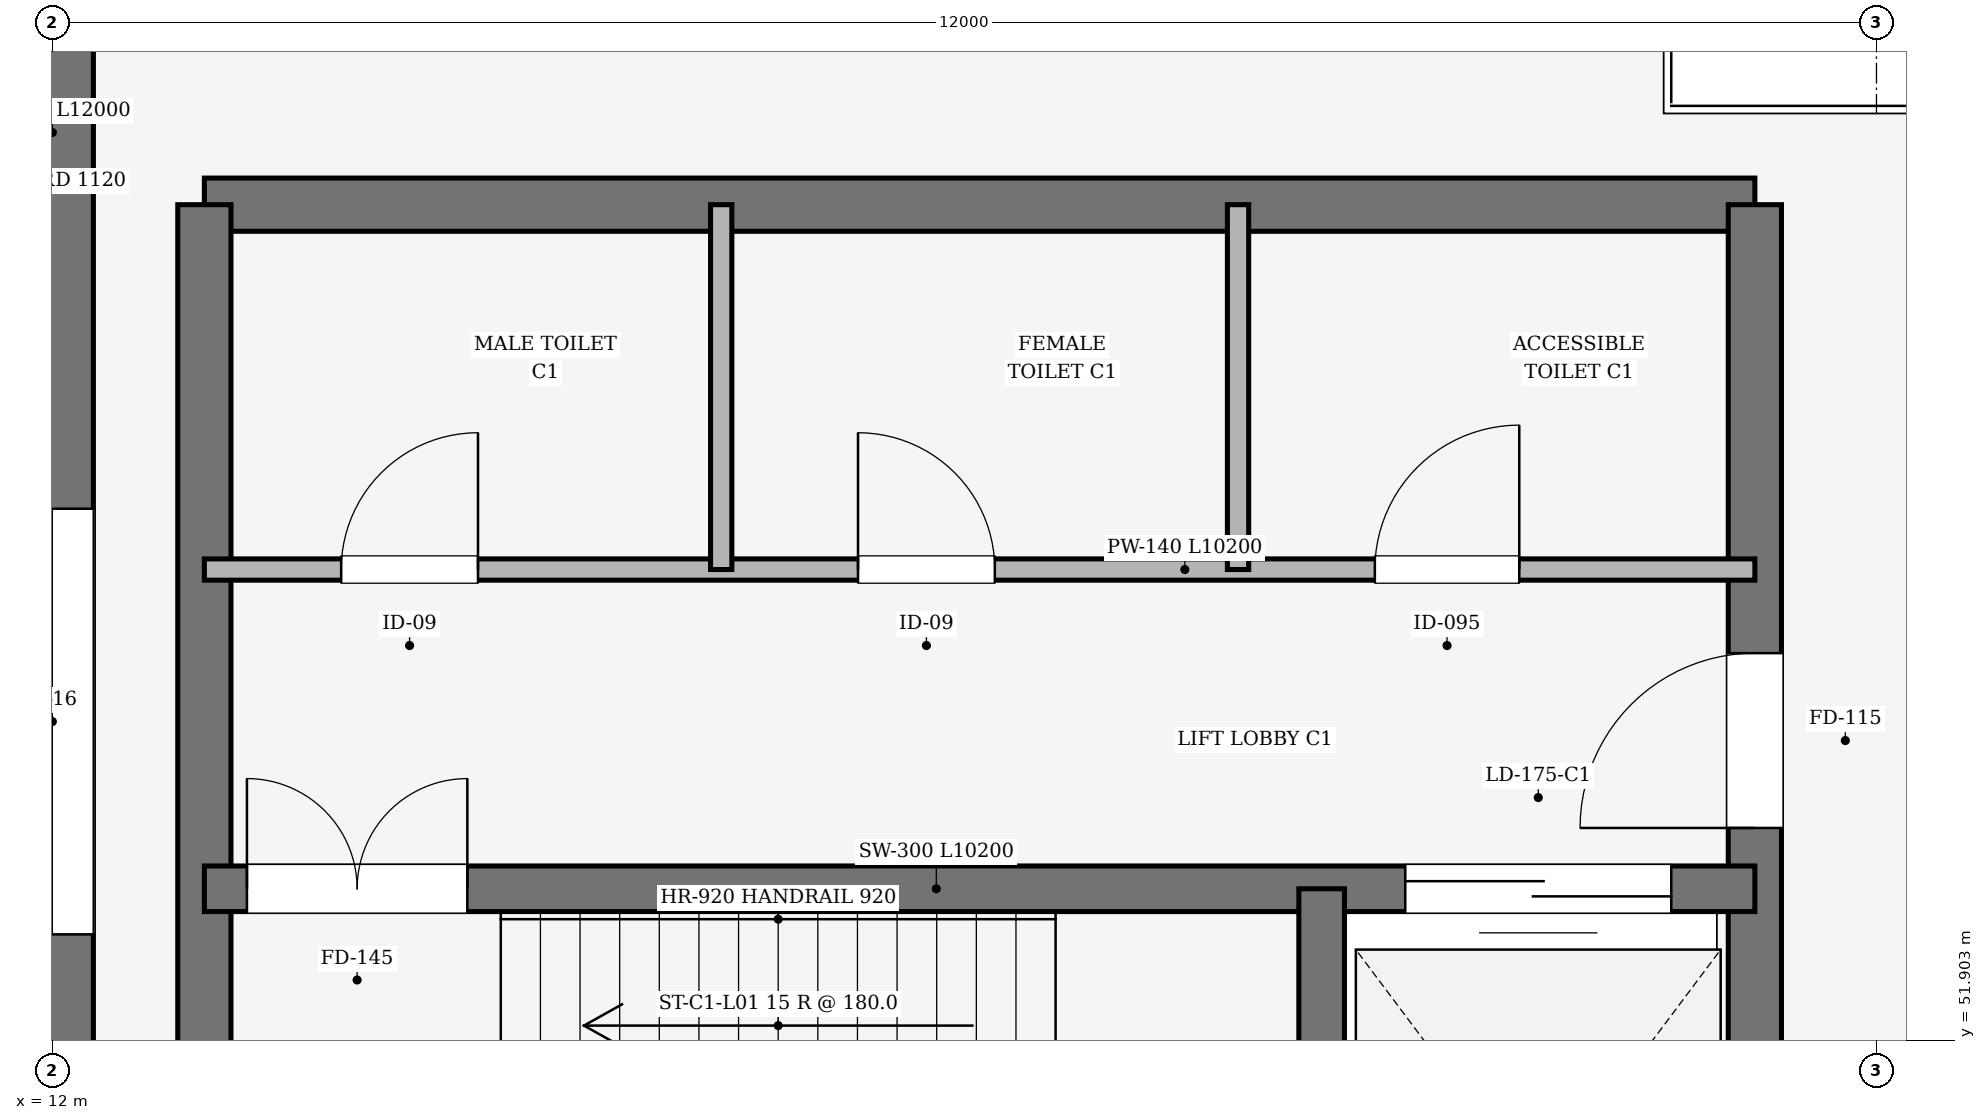
"""IFC4 building model, lengths in metres.
Left out: names, types, materials, properties, quantities, classifications, styles, units other than length and angle.
Written with IfcOpenShell. Run it as: python <this file> out.ifc"""

import sys

from ifc_helpers import new_model, si_unit, direction, frame, frame_2d, origin, place, context, subcontext, project, spatial, rectangle, extrude, element, fill, save


model = new_model("IFC4")
c1 = context("Model", 3, precision=1e-05, world=origin(), true_north=direction((0.0, 1.0)))
c2 = subcontext(c1, "Body", "Model", "MODEL_VIEW")
j1 = project(units=[si_unit("LENGTHUNIT", "METRE"), si_unit("PLANEANGLEUNIT", "RADIAN")], contexts=[c1])
p1 = place(None, origin())
s1 = spatial("IfcSite", under=j1, at=p1, CompositionType="ELEMENT")
p2 = place(p1, origin())
s2 = spatial("IfcBuilding", under=s1, at=p2, CompositionType="ELEMENT")
p3 = place(p2, frame((0.0, 0.0, 5.4)))
s3 = spatial("IfcBuildingStorey", under=s2, at=p3, CompositionType="ELEMENT", Elevation=5.4)
p4 = place(p3, frame((12.0, 60.0, 0.0), z_axis=(0.0, 0.0, 1.0), x_axis=(0.0, -1.0, 0.0)))
e1 = element("IfcWall", 1, at=p4, inside=s3, PredefinedType="SOLIDWALL", context=c2, shape_type="SweptSolid", body=[
    extrude(rectangle(XDim=12.0, YDim=0.54, at=frame_2d((6.0, 0.0))), origin(), (0.0, 0.0, 1.0), 4.0),
])
p5 = place(p4, frame((4.6, 0.0, 1.3)))
e2 = element("IfcOpeningElement", 2, at=p5, cuts=e1, PredefinedType="OPENING", context=c2, shape_type="SweptSolid", body=[
    extrude(rectangle(XDim=2.8, YDim=1.35, at=frame_2d((1.4, 0.675))), frame((0.0, 0.28, 0.0), z_axis=(0.0, -1.0, 0.0), x_axis=(1.0, 0.0, 0.0)), (0.0, 0.0, 1.0), 0.56),
])
p6 = place(p3, frame((23.2, 57.4, 0.0), z_axis=(0.0, 0.0, 1.0), x_axis=(-1.0, 0.0, 0.0)))
e3 = element("IfcWall", 3, at=p6, inside=s3, PredefinedType="SHEAR", context=c2, shape_type="SweptSolid", body=[
    extrude(rectangle(XDim=10.2, YDim=0.35, at=frame_2d((5.1, 0.0))), origin(), (0.0, 0.0, 1.0), 5.4),
])
p7 = place(p3, frame((13.0, 57.4, 0.0), z_axis=(0.0, 0.0, 1.0), x_axis=(0.0, -1.0, 0.0)))
e4 = element("IfcWall", 4, at=p7, inside=s3, PredefinedType="SHEAR", context=c2, shape_type="SweptSolid", body=[
    extrude(rectangle(XDim=8.4, YDim=0.35, at=frame_2d((4.2, 0.0))), origin(), (0.0, 0.0, 1.0), 5.4),
])
p8 = place(p3, frame((23.2, 49.0, 0.0), z_axis=(0.0, 0.0, 1.0), x_axis=(0.0, 1.0, 0.0)))
e5 = element("IfcWall", 5, at=p8, inside=s3, PredefinedType="SHEAR", context=c2, shape_type="SweptSolid", body=[
    extrude(rectangle(XDim=8.4, YDim=0.35, at=frame_2d((4.2, 0.0))), origin(), (0.0, 0.0, 1.0), 5.4),
])
p9 = place(p8, frame((4.3, 0.0, 0.0)))
e6 = element("IfcOpeningElement", 6, at=p9, cuts=e5, PredefinedType="OPENING", context=c2, shape_type="SweptSolid", body=[
    extrude(rectangle(XDim=1.15, YDim=2.15, at=frame_2d((0.575, 1.075))), frame((0.0, 0.185, 0.0), z_axis=(0.0, -1.0, 0.0), x_axis=(1.0, 0.0, 0.0)), (0.0, 0.0, 1.0), 0.37),
])
p10 = place(p3, frame((13.0, 52.9, 0.0), z_axis=(0.0, 0.0, 1.0), x_axis=(1.0, 0.0, 0.0)))
e7 = element("IfcWall", 7, at=p10, inside=s3, PredefinedType="SHEAR", context=c2, shape_type="SweptSolid", body=[
    extrude(rectangle(XDim=10.2, YDim=0.3, at=frame_2d((5.1, 0.0))), origin(), (0.0, 0.0, 1.0), 5.4),
])
p11 = place(p10, frame((0.28, 0.0, 0.0)))
e8 = element("IfcOpeningElement", 8, at=p11, cuts=e7, PredefinedType="OPENING", context=c2, shape_type="SweptSolid", body=[
    extrude(rectangle(XDim=1.45, YDim=2.15, at=frame_2d((0.725, 1.075))), frame((0.0, 0.16, 0.0), z_axis=(0.0, -1.0, 0.0), x_axis=(1.0, 0.0, 0.0)), (0.0, 0.0, 1.0), 0.32),
])
p12 = place(p10, frame((7.9, 0.0, 0.0)))
e9 = element("IfcOpeningElement", 9, at=p12, cuts=e7, PredefinedType="OPENING", context=c2, shape_type="SweptSolid", body=[
    extrude(rectangle(XDim=1.75, YDim=2.3, at=frame_2d((0.875, 1.15))), frame((0.0, 0.16, 0.0), z_axis=(0.0, -1.0, 0.0), x_axis=(1.0, 0.0, 0.0)), (0.0, 0.0, 1.0), 0.32),
])
p13 = place(p3, frame((20.35, 49.0, 0.0), z_axis=(0.0, 0.0, 1.0), x_axis=(0.0, 1.0, 0.0)))
e10 = element("IfcWall", 10, at=p13, inside=s3, PredefinedType="SHEAR", context=c2, shape_type="SweptSolid", body=[
    extrude(rectangle(XDim=3.9, YDim=0.3, at=frame_2d((1.95, 0.0))), origin(), (0.0, 0.0, 1.0), 5.4),
])
p14 = place(p3, frame((13.0, 55.0, 0.0), z_axis=(0.0, 0.0, 1.0), x_axis=(1.0, 0.0, 0.0)))
e11 = element("IfcWall", 11, at=p14, inside=s3, PredefinedType="PARTITIONING", context=c2, shape_type="SweptSolid", body=[
    extrude(rectangle(XDim=10.2, YDim=0.14, at=frame_2d((5.1, 0.0))), origin(), (0.0, 0.0, 1.0), 4.035),
])
p15 = place(p14, frame((0.9, 0.0, 0.0)))
e12 = element("IfcOpeningElement", 12, at=p15, cuts=e11, PredefinedType="OPENING", context=c2, shape_type="SweptSolid", body=[
    extrude(rectangle(XDim=0.9, YDim=2.1, at=frame_2d((0.45, 1.05))), frame((0.0, 0.08, 0.0), z_axis=(0.0, -1.0, 0.0), x_axis=(1.0, 0.0, 0.0)), (0.0, 0.0, 1.0), 0.16),
])
p16 = place(p14, frame((4.3, 0.0, 0.0)))
e13 = element("IfcOpeningElement", 13, at=p16, cuts=e11, PredefinedType="OPENING", context=c2, shape_type="SweptSolid", body=[
    extrude(rectangle(XDim=0.9, YDim=2.1, at=frame_2d((0.45, 1.05))), frame((0.0, 0.08, 0.0), z_axis=(0.0, -1.0, 0.0), x_axis=(1.0, 0.0, 0.0)), (0.0, 0.0, 1.0), 0.16),
])
p17 = place(p14, frame((7.7, 0.0, 0.0)))
e14 = element("IfcOpeningElement", 14, at=p17, cuts=e11, PredefinedType="OPENING", context=c2, shape_type="SweptSolid", body=[
    extrude(rectangle(XDim=0.95, YDim=2.1, at=frame_2d((0.475, 1.05))), frame((0.0, 0.08, 0.0), z_axis=(0.0, -1.0, 0.0), x_axis=(1.0, 0.0, 0.0)), (0.0, 0.0, 1.0), 0.16),
])
for number, where, z_axis, x_axis in (
    (15, (16.4, 55.0, 0.0), (0.0, 0.0, 1.0), (0.0, 1.0, 0.0)),
    (16, (19.8, 55.0, 0.0), (0.0, 0.0, 1.0), (0.0, 1.0, 0.0)),
):
    element("IfcWall", number, at=place(p3, frame(where, z_axis=z_axis, x_axis=x_axis)), inside=s3, PredefinedType="PARTITIONING", context=c2, shape_type="SweptSolid", body=[
        extrude(rectangle(XDim=2.4, YDim=0.14, at=frame_2d((1.2, 0.0))), origin(), (0.0, 0.0, 1.0), 4.5),
    ])
p18 = place(p5, origin())
e17 = element("IfcWindow", 17, at=p18, inside=s3, PartitioningType="TRIPLE_PANEL_HORIZONTAL", PredefinedType="WINDOW", context=c2, shape_type="SweptSolid", body=[
    extrude(rectangle(XDim=2.8, YDim=1.35, at=frame_2d((1.4, 0.675))), frame((0.0, 0.03, 0.0), z_axis=(0.0, -1.0, 0.0), x_axis=(1.0, 0.0, 0.0)), (0.0, 0.0, 1.0), 0.06),
])
fill(e2, e17)
p19 = place(p9, origin())
e18 = element("IfcDoor", 18, at=p19, inside=s3, OperationType="SINGLE_SWING_LEFT", PredefinedType="DOOR", context=c2, shape_type="SweptSolid", body=[
    extrude(rectangle(XDim=1.15, YDim=2.15, at=frame_2d((0.575, 1.075))), frame((0.0, 0.025, 0.0), z_axis=(0.0, -1.0, 0.0), x_axis=(1.0, 0.0, 0.0)), (0.0, 0.0, 1.0), 0.05),
])
fill(e6, e18)
p20 = place(p11, origin())
e19 = element("IfcDoor", 19, at=p20, inside=s3, OperationType="DOUBLE_DOOR_SINGLE_SWING", PredefinedType="DOOR", context=c2, shape_type="SweptSolid", body=[
    extrude(rectangle(XDim=1.45, YDim=2.15, at=frame_2d((0.725, 1.075))), frame((0.0, 0.025, 0.0), z_axis=(0.0, -1.0, 0.0), x_axis=(1.0, 0.0, 0.0)), (0.0, 0.0, 1.0), 0.05),
])
fill(e8, e19)
p21 = place(p12, origin())
e20 = element("IfcDoor", 20, at=p21, inside=s3, OperationType="DOUBLE_DOOR_SLIDING", PredefinedType="DOOR", context=c2, shape_type="SweptSolid", body=[
    extrude(rectangle(XDim=1.75, YDim=2.3, at=frame_2d((0.875, 1.15))), frame((0.0, 0.025, 0.0), z_axis=(0.0, -1.0, 0.0), x_axis=(1.0, 0.0, 0.0)), (0.0, 0.0, 1.0), 0.05),
])
fill(e9, e20)
p22 = place(p15, origin())
e21 = element("IfcDoor", 21, at=p22, inside=s3, OperationType="SINGLE_SWING_RIGHT", PredefinedType="DOOR", context=c2, shape_type="SweptSolid", body=[
    extrude(rectangle(XDim=0.9, YDim=2.1, at=frame_2d((0.45, 1.05))), frame((0.0, 0.025, 0.0), z_axis=(0.0, -1.0, 0.0), x_axis=(1.0, 0.0, 0.0)), (0.0, 0.0, 1.0), 0.05),
])
fill(e12, e21)
p23 = place(p16, origin())
e22 = element("IfcDoor", 22, at=p23, inside=s3, OperationType="SINGLE_SWING_LEFT", PredefinedType="DOOR", context=c2, shape_type="SweptSolid", body=[
    extrude(rectangle(XDim=0.9, YDim=2.1, at=frame_2d((0.45, 1.05))), frame((0.0, 0.025, 0.0), z_axis=(0.0, -1.0, 0.0), x_axis=(1.0, 0.0, 0.0)), (0.0, 0.0, 1.0), 0.05),
])
fill(e13, e22)
p24 = place(p17, origin())
e23 = element("IfcDoor", 23, at=p24, inside=s3, OperationType="SINGLE_SWING_RIGHT", PredefinedType="DOOR", context=c2, shape_type="SweptSolid", body=[
    extrude(rectangle(XDim=0.95, YDim=2.1, at=frame_2d((0.475, 1.05))), frame((0.0, 0.025, 0.0), z_axis=(0.0, -1.0, 0.0), x_axis=(1.0, 0.0, 0.0)), (0.0, 0.0, 1.0), 0.05),
])
fill(e14, e23)
save(model, sys.argv[1])
